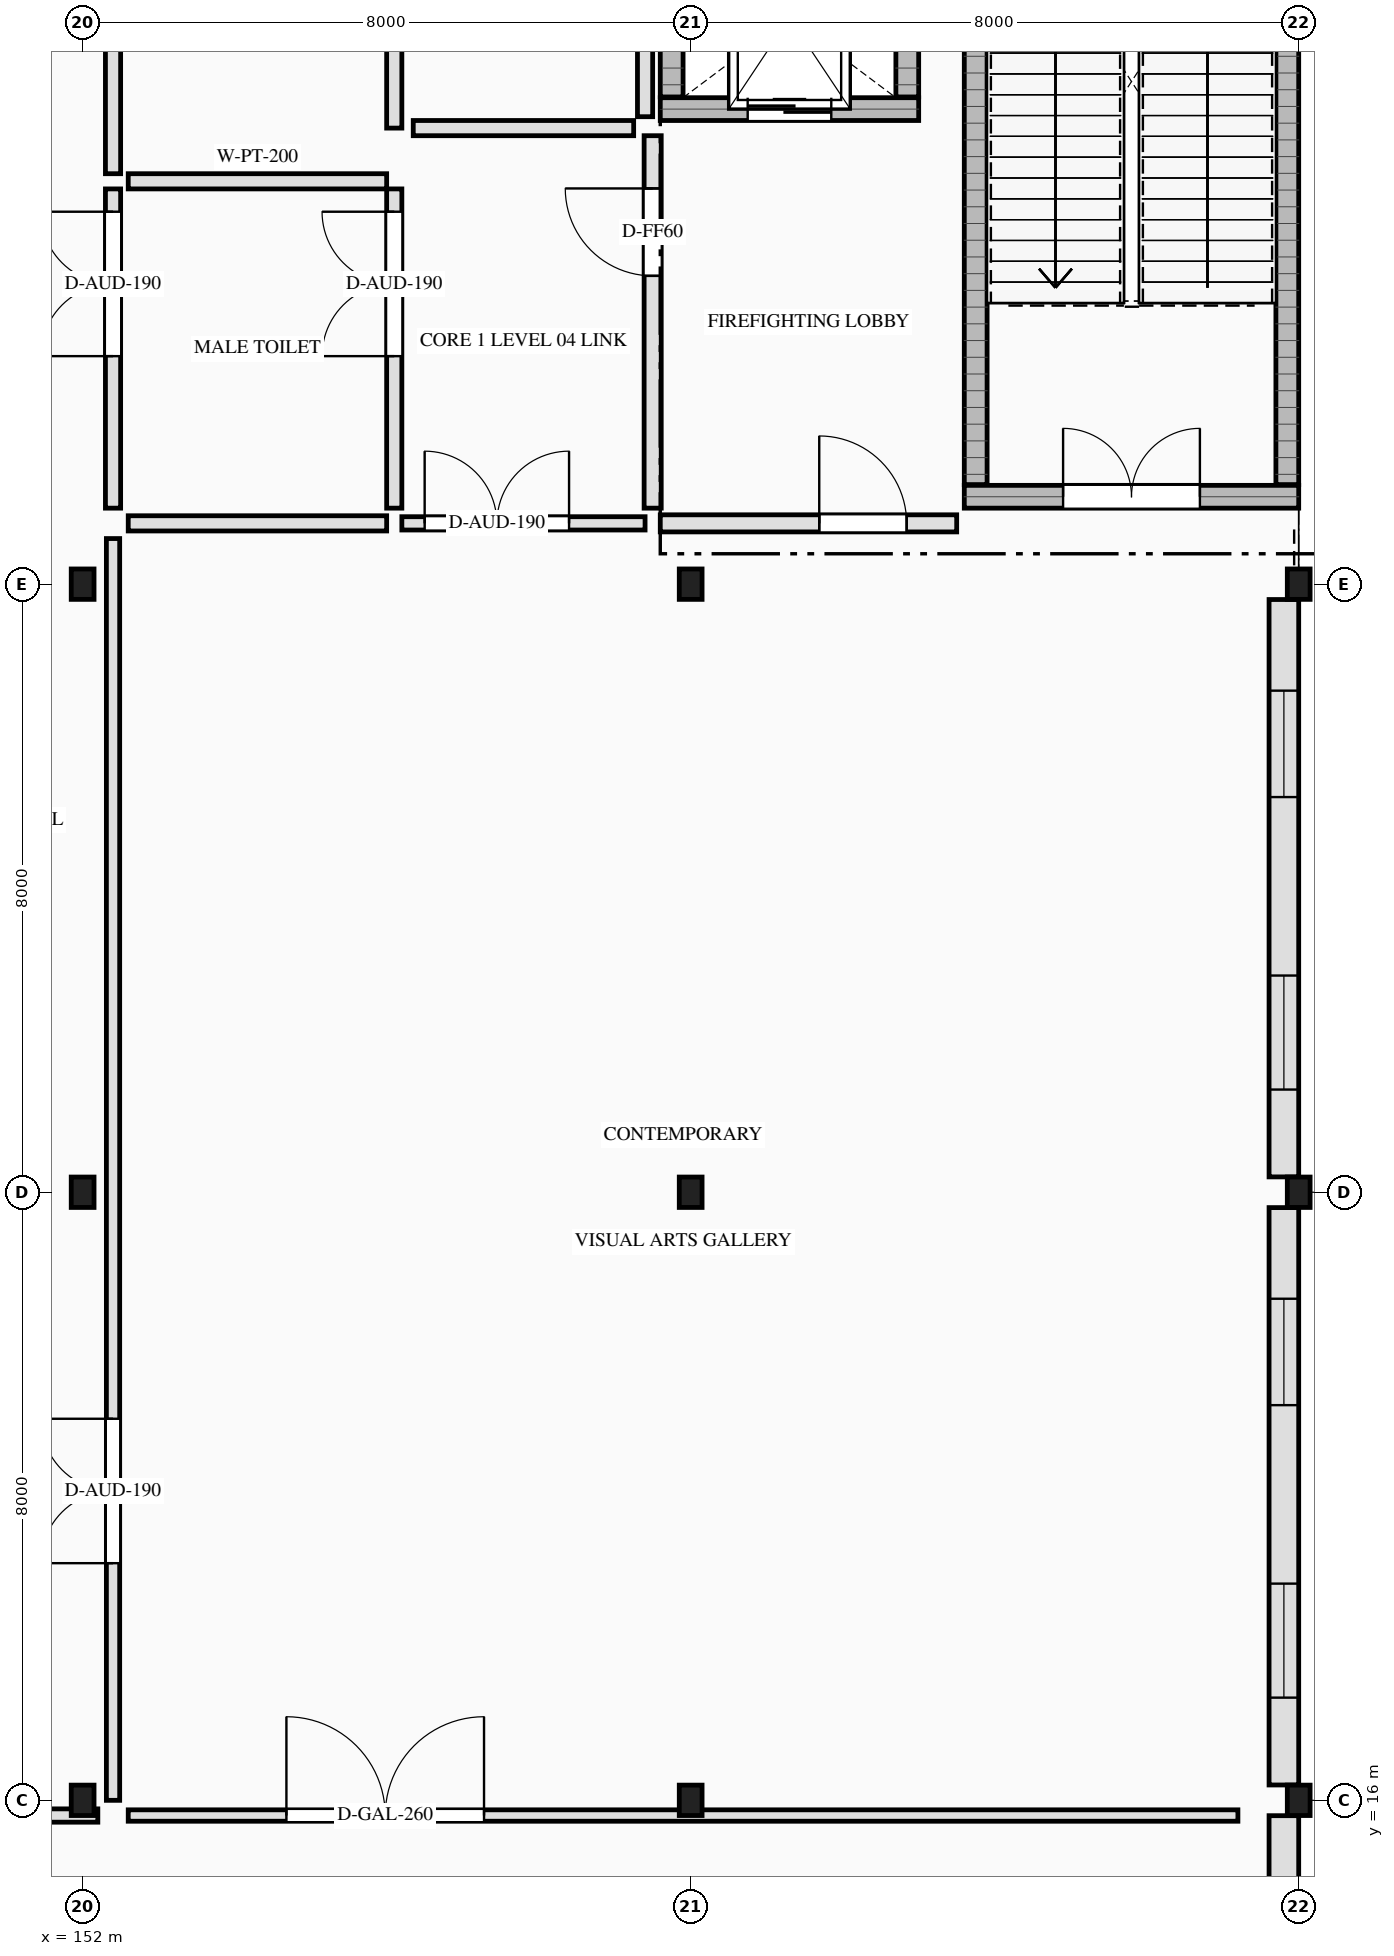
"""IFC4 building model, lengths in metres.
Left out: names, types, materials, properties, quantities, classifications, styles, units other than length and angle.
Written with IfcOpenShell. Run it as: python <this file> out.ifc"""

import sys

from ifc_helpers import new_model, si_unit, direction, frame, frame_2d, origin, origin_2d, place, context, subcontext, project, spatial, rectangle, i_section, extrude, element, fill, save


model = new_model("IFC4")
c1 = context("Model", 3, precision=1e-05, world=origin(), true_north=direction((0.0, 1.0)))
c2 = subcontext(c1, "Body", "Model", "MODEL_VIEW")
j1 = project(units=[si_unit("LENGTHUNIT", "METRE"), si_unit("PLANEANGLEUNIT", "RADIAN")], contexts=[c1])
p1 = place(None, origin())
s1 = spatial("IfcSite", under=j1, at=p1, CompositionType="ELEMENT")
p2 = place(p1, origin())
s2 = spatial("IfcBuilding", under=s1, at=p2, CompositionType="ELEMENT")
p3 = place(p2, frame((0.0, 0.0, 21.8)))
s3 = spatial("IfcBuildingStorey", under=s2, at=p3, CompositionType="ELEMENT", Elevation=21.8)
p4 = place(p3, frame((163.6, 33.15, 0.0), z_axis=(0.0, 0.0, 1.0), x_axis=(1.0, 0.0, 0.0)))
e1 = element("IfcWall", 1, at=p4, inside=s3, PredefinedType="SHEAR", context=c2, shape_type="SweptSolid", body=[
    extrude(rectangle(XDim=4.4, YDim=0.3, at=frame_2d((2.2, 0.0))), origin(), (0.0, 0.0, 1.0), 4.2),
])
p5 = place(p4, frame((1.3, 0.0, 0.0)))
e2 = element("IfcOpeningElement", 2, at=p5, cuts=e1, PredefinedType="OPENING", context=c2, shape_type="SweptSolid", body=[
    extrude(rectangle(XDim=1.8, YDim=2.2, at=frame_2d((0.9, 1.1))), frame((0.0, 0.16, 0.0), z_axis=(0.0, -1.0, 0.0), x_axis=(1.0, 0.0, 0.0)), (0.0, 0.0, 1.0), 0.32),
])
for number, where, z_axis, x_axis in (
    (3, (163.75, 33.31, 0.0), (0.0, 0.0, 1.0), (0.0, 1.0, 0.0)),
    (4, (167.85, 33.31, 0.0), (0.0, 0.0, 1.0), (0.0, 1.0, 0.0)),
):
    element("IfcWall", number, at=place(p3, frame(where, z_axis=z_axis, x_axis=x_axis)), inside=s3, PredefinedType="SHEAR", context=c2, shape_type="SweptSolid", body=[
        extrude(rectangle(XDim=9.38, YDim=0.3, at=frame_2d((4.69, 0.0))), origin(), (0.0, 0.0, 1.0), 4.2),
    ])
p6 = place(p3, frame((159.6, 38.25, 0.0), z_axis=(0.0, 0.0, 1.0), x_axis=(1.0, 0.0, 0.0)))
e5 = element("IfcWall", 5, at=p6, inside=s3, PredefinedType="SHEAR", context=c2, shape_type="SweptSolid", body=[
    extrude(rectangle(XDim=3.4, YDim=0.3, at=frame_2d((1.7, 0.0))), origin(), (0.0, 0.0, 1.0), 4.2),
])
p7 = place(p6, frame((1.15, 0.0, 0.0)))
e6 = element("IfcOpeningElement", 6, at=p7, cuts=e5, PredefinedType="OPENING", context=c2, shape_type="SweptSolid", body=[
    extrude(rectangle(XDim=1.1, YDim=2.15, at=frame_2d((0.55, 1.075))), frame((0.0, 0.16, 0.0), z_axis=(0.0, -1.0, 0.0), x_axis=(1.0, 0.0, 0.0)), (0.0, 0.0, 1.0), 0.32),
])
for number, where, z_axis, x_axis in (
    (7, (159.75, 38.41, 0.0), (0.0, 0.0, 1.0), (0.0, 1.0, 0.0)),
    (8, (162.85, 38.41, 0.0), (0.0, 0.0, 1.0), (0.0, 1.0, 0.0)),
):
    element("IfcWall", number, at=place(p3, frame(where, z_axis=z_axis, x_axis=x_axis)), inside=s3, PredefinedType="SHEAR", context=c2, shape_type="SweptSolid", body=[
        extrude(rectangle(XDim=2.08, YDim=0.3, at=frame_2d((1.04, 0.0))), origin(), (0.0, 0.0, 1.0), 4.2),
    ])
for number, where, z_axis, x_axis in (
    (9, (152.0, 16.0, 0.0), (0.0, 0.0, 1.0), (1.0, 0.0, 0.0)),
    (10, (152.0, 24.0, 0.0), (0.0, 0.0, 1.0), (1.0, 0.0, 0.0)),
    (11, (152.0, 32.0, 0.0), (0.0, 0.0, 1.0), (1.0, 0.0, 0.0)),
    (12, (160.0, 16.0, 0.0), (0.0, 0.0, 1.0), (1.0, 0.0, 0.0)),
    (13, (160.0, 24.0, 0.0), (0.0, 0.0, 1.0), (1.0, 0.0, 0.0)),
    (14, (160.0, 32.0, 0.0), (0.0, 0.0, 1.0), (1.0, 0.0, 0.0)),
    (15, (168.0, 16.0, 0.0), (0.0, 0.0, 1.0), (1.0, 0.0, 0.0)),
    (16, (168.0, 24.0, 0.0), (0.0, 0.0, 1.0), (1.0, 0.0, 0.0)),
    (17, (168.0, 32.0, 0.0), (0.0, 0.0, 1.0), (1.0, 0.0, 0.0)),
):
    element("IfcColumn", number, at=place(p3, frame(where, z_axis=z_axis, x_axis=x_axis)), inside=s3, PredefinedType="COLUMN", context=c2, shape_type="SweptSolid", body=[
        extrude(i_section(OverallWidth=0.3, OverallDepth=0.4, WebThickness=0.013, FlangeThickness=0.024, FilletRadius=0.027, at=origin_2d()), origin(), (0.0, 0.0, 1.0), 4.2),
    ])
p8 = place(p3, frame((167.805, 15.798, 0.0), z_axis=(0.0, 0.0, 1.0), x_axis=(0.0, -1.0, 0.0)))
e18 = element("IfcWall", 18, at=p8, inside=s3, PredefinedType="SOLIDWALL", context=c2, shape_type="SweptSolid", body=[
    extrude(rectangle(XDim=7.596, YDim=0.39, at=frame_2d((3.798, 0.0))), origin(), (0.0, 0.0, 1.0), 3.415),
])
p9 = place(p3, frame((167.805, 23.798, 0.0), z_axis=(0.0, 0.0, 1.0), x_axis=(0.0, -1.0, 0.0)))
e19 = element("IfcWall", 19, at=p9, inside=s3, PredefinedType="SOLIDWALL", context=c2, shape_type="SweptSolid", body=[
    extrude(rectangle(XDim=7.596, YDim=0.39, at=frame_2d((3.798, 0.0))), origin(), (0.0, 0.0, 1.0), 3.415),
])
p10 = place(p9, frame((1.199, 0.0, 0.85)))
e20 = element("IfcOpeningElement", 20, at=p10, cuts=e19, PredefinedType="OPENING", context=c2, shape_type="SweptSolid", body=[
    extrude(rectangle(XDim=1.4, YDim=1.6, at=frame_2d((0.7, 0.8))), frame((0.0, 0.205, 0.0), z_axis=(0.0, -1.0, 0.0), x_axis=(1.0, 0.0, 0.0)), (0.0, 0.0, 1.0), 0.41),
])
p11 = place(p9, frame((4.947, 0.0, 0.85)))
e21 = element("IfcOpeningElement", 21, at=p11, cuts=e19, PredefinedType="OPENING", context=c2, shape_type="SweptSolid", body=[
    extrude(rectangle(XDim=1.5, YDim=2.4, at=frame_2d((0.75, 1.2))), frame((0.0, 0.205, 0.0), z_axis=(0.0, -1.0, 0.0), x_axis=(1.0, 0.0, 0.0)), (0.0, 0.0, 1.0), 0.41),
])
p12 = place(p3, frame((167.805, 31.798, 0.0), z_axis=(0.0, 0.0, 1.0), x_axis=(0.0, -1.0, 0.0)))
e22 = element("IfcWall", 22, at=p12, inside=s3, PredefinedType="SOLIDWALL", context=c2, shape_type="SweptSolid", body=[
    extrude(rectangle(XDim=7.596, YDim=0.39, at=frame_2d((3.798, 0.0))), origin(), (0.0, 0.0, 1.0), 3.415),
])
p13 = place(p12, frame((1.199, 0.0, 0.85)))
e23 = element("IfcOpeningElement", 23, at=p13, cuts=e22, PredefinedType="OPENING", context=c2, shape_type="SweptSolid", body=[
    extrude(rectangle(XDim=1.4, YDim=1.6, at=frame_2d((0.7, 0.8))), frame((0.0, 0.205, 0.0), z_axis=(0.0, -1.0, 0.0), x_axis=(1.0, 0.0, 0.0)), (0.0, 0.0, 1.0), 0.41),
])
p14 = place(p12, frame((4.947, 0.0, 0.85)))
e24 = element("IfcOpeningElement", 24, at=p14, cuts=e22, PredefinedType="OPENING", context=c2, shape_type="SweptSolid", body=[
    extrude(rectangle(XDim=1.5, YDim=2.4, at=frame_2d((0.75, 1.2))), frame((0.0, 0.205, 0.0), z_axis=(0.0, -1.0, 0.0), x_axis=(1.0, 0.0, 0.0)), (0.0, 0.0, 1.0), 0.41),
])
p15 = place(p3, frame((159.5, 33.0, 0.0), z_axis=(0.0, 0.0, 1.0), x_axis=(0.0, 1.0, 0.0)))
e25 = element("IfcWall", 25, at=p15, inside=s3, PredefinedType="SOLIDWALL", context=c2, shape_type="SweptSolid", body=[
    extrude(rectangle(XDim=4.9, YDim=0.225, at=frame_2d((2.45, 0.0))), origin(), (0.0, 0.0, 1.0), 3.92),
])
p16 = place(p15, frame((3.056, 0.0, 0.0)))
e26 = element("IfcOpeningElement", 26, at=p16, cuts=e25, PredefinedType="OPENING", context=c2, shape_type="SweptSolid", body=[
    extrude(rectangle(XDim=1.15, YDim=2.2, at=frame_2d((0.575, 1.1))), frame((0.0, 0.123, 0.0), z_axis=(0.0, -1.0, 0.0), x_axis=(1.0, 0.0, 0.0)), (0.0, 0.0, 1.0), 0.245),
])
p17 = place(p3, frame((159.6, 32.8, 0.0), z_axis=(0.0, 0.0, 1.0), x_axis=(1.0, 0.0, 0.0)))
e27 = element("IfcWall", 27, at=p17, inside=s3, PredefinedType="SOLIDWALL", context=c2, shape_type="SweptSolid", body=[
    extrude(rectangle(XDim=3.9, YDim=0.225, at=frame_2d((1.95, 0.0))), origin(), (0.0, 0.0, 1.0), 3.92),
])
p18 = place(p17, frame((2.092, 0.0, 0.0)))
e28 = element("IfcOpeningElement", 28, at=p18, cuts=e27, PredefinedType="OPENING", context=c2, shape_type="SweptSolid", body=[
    extrude(rectangle(XDim=1.15, YDim=2.2, at=frame_2d((0.575, 1.1))), frame((0.0, 0.123, 0.0), z_axis=(0.0, -1.0, 0.0), x_axis=(1.0, 0.0, 0.0)), (0.0, 0.0, 1.0), 0.245),
])
p19 = place(p3, frame((152.6, 37.3, 0.0), z_axis=(0.0, 0.0, 1.0), x_axis=(1.0, 0.0, 0.0)))
e29 = element("IfcWall", 29, at=p19, inside=s3, PredefinedType="PARTITIONING", context=c2, shape_type="SweptSolid", body=[
    extrude(rectangle(XDim=3.4, YDim=0.2, at=frame_2d((1.7, 0.0))), origin(), (0.0, 0.0, 1.0), 3.92),
])
p20 = place(p3, frame((152.4, 33.0, 0.0), z_axis=(0.0, 0.0, 1.0), x_axis=(0.0, 1.0, 0.0)))
e30 = element("IfcWall", 30, at=p20, inside=s3, PredefinedType="PARTITIONING", context=c2, shape_type="SweptSolid", body=[
    extrude(rectangle(XDim=4.2, YDim=0.2, at=frame_2d((2.1, 0.0))), origin(), (0.0, 0.0, 1.0), 3.92),
])
p21 = place(p20, frame((2.0, 0.0, 0.0)))
e31 = element("IfcOpeningElement", 31, at=p21, cuts=e30, PredefinedType="OPENING", context=c2, shape_type="SweptSolid", body=[
    extrude(rectangle(XDim=1.9, YDim=2.35, at=frame_2d((0.95, 1.175))), frame((0.0, 0.11, 0.0), z_axis=(0.0, -1.0, 0.0), x_axis=(1.0, 0.0, 0.0)), (0.0, 0.0, 1.0), 0.22),
])
p22 = place(p3, frame((156.1, 33.0, 0.0), z_axis=(0.0, 0.0, 1.0), x_axis=(0.0, 1.0, 0.0)))
e32 = element("IfcWall", 32, at=p22, inside=s3, PredefinedType="PARTITIONING", context=c2, shape_type="SweptSolid", body=[
    extrude(rectangle(XDim=4.2, YDim=0.2, at=frame_2d((2.1, 0.0))), origin(), (0.0, 0.0, 1.0), 3.92),
])
p23 = place(p22, frame((2.0, 0.0, 0.0)))
e33 = element("IfcOpeningElement", 33, at=p23, cuts=e32, PredefinedType="OPENING", context=c2, shape_type="SweptSolid", body=[
    extrude(rectangle(XDim=1.9, YDim=2.35, at=frame_2d((0.95, 1.175))), frame((0.0, 0.11, 0.0), z_axis=(0.0, -1.0, 0.0), x_axis=(1.0, 0.0, 0.0)), (0.0, 0.0, 1.0), 0.22),
])
p24 = place(p3, frame((152.6, 32.8, 0.0), z_axis=(0.0, 0.0, 1.0), x_axis=(1.0, 0.0, 0.0)))
e34 = element("IfcWall", 34, at=p24, inside=s3, PredefinedType="PARTITIONING", context=c2, shape_type="SweptSolid", body=[
    extrude(rectangle(XDim=3.4, YDim=0.2, at=frame_2d((1.7, 0.0))), origin(), (0.0, 0.0, 1.0), 3.92),
])
p25 = place(p3, frame((156.1, 38.0, 0.0), z_axis=(0.0, 0.0, 1.0), x_axis=(0.0, 1.0, 0.0)))
e35 = element("IfcWall", 35, at=p25, inside=s3, PredefinedType="PARTITIONING", context=c2, shape_type="SweptSolid", body=[
    extrude(rectangle(XDim=3.6, YDim=0.2, at=frame_2d((1.8, 0.0))), origin(), (0.0, 0.0, 1.0), 3.92),
])
p26 = place(p3, frame((152.4, 37.4, 0.0), z_axis=(0.0, 0.0, 1.0), x_axis=(0.0, 1.0, 0.0)))
e36 = element("IfcWall", 36, at=p26, inside=s3, PredefinedType="PARTITIONING", context=c2, shape_type="SweptSolid", body=[
    extrude(rectangle(XDim=4.2, YDim=0.2, at=frame_2d((2.1, 0.0))), origin(), (0.0, 0.0, 1.0), 3.92),
])
p27 = place(p3, frame((149.0, 15.8, 0.0), z_axis=(0.0, 0.0, 1.0), x_axis=(1.0, 0.0, 0.0)))
e37 = element("IfcWall", 37, at=p27, inside=s3, PredefinedType="PARTITIONING", context=c2, shape_type="SweptSolid", body=[
    extrude(rectangle(XDim=3.2, YDim=0.175, at=frame_2d((1.6, 0.0))), origin(), (0.0, 0.0, 1.0), 3.48),
])
p28 = place(p3, frame((152.4, 16.0, 0.0), z_axis=(0.0, 0.0, 1.0), x_axis=(0.0, 1.0, 0.0)))
e38 = element("IfcWall", 38, at=p28, inside=s3, PredefinedType="PARTITIONING", context=c2, shape_type="SweptSolid", body=[
    extrude(rectangle(XDim=16.6, YDim=0.175, at=frame_2d((8.3, 0.0))), origin(), (0.0, 0.0, 1.0), 3.92),
])
p29 = place(p28, frame((3.12, 0.0, 0.0)))
e39 = element("IfcOpeningElement", 39, at=p29, cuts=e38, PredefinedType="OPENING", context=c2, shape_type="SweptSolid", body=[
    extrude(rectangle(XDim=1.9, YDim=2.35, at=frame_2d((0.95, 1.175))), frame((0.0, 0.097, 0.0), z_axis=(0.0, -1.0, 0.0), x_axis=(1.0, 0.0, 0.0)), (0.0, 0.0, 1.0), 0.195),
])
p30 = place(p3, frame((156.2, 32.8, 0.0), z_axis=(0.0, 0.0, 1.0), x_axis=(1.0, 0.0, 0.0)))
e40 = element("IfcWall", 40, at=p30, inside=s3, PredefinedType="PARTITIONING", context=c2, shape_type="SweptSolid", body=[
    extrude(rectangle(XDim=3.2, YDim=0.175, at=frame_2d((1.6, 0.0))), origin(), (0.0, 0.0, 1.0), 3.92),
])
p31 = place(p30, frame((0.3, 0.0, 0.0)))
e41 = element("IfcOpeningElement", 41, at=p31, cuts=e40, PredefinedType="OPENING", context=c2, shape_type="SweptSolid", body=[
    extrude(rectangle(XDim=1.9, YDim=2.35, at=frame_2d((0.95, 1.175))), frame((0.0, 0.097, 0.0), z_axis=(0.0, -1.0, 0.0), x_axis=(1.0, 0.0, 0.0)), (0.0, 0.0, 1.0), 0.195),
])
p32 = place(p3, frame((152.6, 15.8, 0.0), z_axis=(0.0, 0.0, 1.0), x_axis=(1.0, 0.0, 0.0)))
e42 = element("IfcWall", 42, at=p32, inside=s3, PredefinedType="PARTITIONING", context=c2, shape_type="SweptSolid", body=[
    extrude(rectangle(XDim=14.6, YDim=0.15, at=frame_2d((7.3, 0.0))), origin(), (0.0, 0.0, 1.0), 3.48),
])
p33 = place(p32, frame((2.081, 0.0, 0.0)))
e43 = element("IfcOpeningElement", 43, at=p33, cuts=e42, PredefinedType="OPENING", context=c2, shape_type="SweptSolid", body=[
    extrude(rectangle(XDim=2.6, YDim=2.9, at=frame_2d((1.3, 1.45))), frame((0.0, 0.085, 0.0), z_axis=(0.0, -1.0, 0.0), x_axis=(1.0, 0.0, 0.0)), (0.0, 0.0, 1.0), 0.17),
])
p34 = place(p3, frame((156.35, 38.0, 0.0), z_axis=(0.0, 0.0, 1.0), x_axis=(1.0, 0.0, 0.0)))
e44 = element("IfcWall", 44, at=p34, inside=s3, PredefinedType="PARTITIONING", context=c2, shape_type="SweptSolid", body=[
    extrude(rectangle(XDim=2.9, YDim=0.2, at=frame_2d((1.45, 0.0))), origin(), (0.0, 0.0, 1.0), 3.92),
])
p35 = place(p3, frame((159.4, 38.15, 0.0), z_axis=(0.0, 0.0, 1.0), x_axis=(0.0, 1.0, 0.0)))
e45 = element("IfcWall", 45, at=p35, inside=s3, PredefinedType="PARTITIONING", context=c2, shape_type="SweptSolid", body=[
    extrude(rectangle(XDim=3.3, YDim=0.2, at=frame_2d((1.65, 0.0))), origin(), (0.0, 0.0, 1.0), 3.92),
])
p36 = place(p10, origin())
e46 = element("IfcWindow", 46, at=p36, inside=s3, PartitioningType="SINGLE_PANEL", PredefinedType="WINDOW", context=c2, shape_type="SweptSolid", body=[
    extrude(rectangle(XDim=1.4, YDim=1.6, at=frame_2d((0.7, 0.8))), frame((0.0, 0.03, 0.0), z_axis=(0.0, -1.0, 0.0), x_axis=(1.0, 0.0, 0.0)), (0.0, 0.0, 1.0), 0.06),
])
fill(e20, e46)
p37 = place(p11, origin())
e47 = element("IfcWindow", 47, at=p37, inside=s3, PartitioningType="SINGLE_PANEL", PredefinedType="WINDOW", context=c2, shape_type="SweptSolid", body=[
    extrude(rectangle(XDim=1.5, YDim=2.4, at=frame_2d((0.75, 1.2))), frame((0.0, 0.03, 0.0), z_axis=(0.0, -1.0, 0.0), x_axis=(1.0, 0.0, 0.0)), (0.0, 0.0, 1.0), 0.06),
])
fill(e21, e47)
p38 = place(p13, origin())
e48 = element("IfcWindow", 48, at=p38, inside=s3, PartitioningType="SINGLE_PANEL", PredefinedType="WINDOW", context=c2, shape_type="SweptSolid", body=[
    extrude(rectangle(XDim=1.4, YDim=1.6, at=frame_2d((0.7, 0.8))), frame((0.0, 0.03, 0.0), z_axis=(0.0, -1.0, 0.0), x_axis=(1.0, 0.0, 0.0)), (0.0, 0.0, 1.0), 0.06),
])
fill(e23, e48)
p39 = place(p14, origin())
e49 = element("IfcWindow", 49, at=p39, inside=s3, PartitioningType="SINGLE_PANEL", PredefinedType="WINDOW", context=c2, shape_type="SweptSolid", body=[
    extrude(rectangle(XDim=1.5, YDim=2.4, at=frame_2d((0.75, 1.2))), frame((0.0, 0.03, 0.0), z_axis=(0.0, -1.0, 0.0), x_axis=(1.0, 0.0, 0.0)), (0.0, 0.0, 1.0), 0.06),
])
fill(e24, e49)
p40 = place(p5, origin())
e50 = element("IfcDoor", 50, at=p40, inside=s3, OperationType="DOUBLE_DOOR_SINGLE_SWING", PredefinedType="DOOR", context=c2, shape_type="SweptSolid", body=[
    extrude(rectangle(XDim=1.8, YDim=2.2, at=frame_2d((0.9, 1.1))), frame((0.0, 0.025, 0.0), z_axis=(0.0, -1.0, 0.0), x_axis=(1.0, 0.0, 0.0)), (0.0, 0.0, 1.0), 0.05),
])
fill(e2, e50)
p41 = place(p7, origin())
e51 = element("IfcDoor", 51, at=p41, inside=s3, OperationType="SLIDING_TO_LEFT", PredefinedType="DOOR", context=c2, shape_type="SweptSolid", body=[
    extrude(rectangle(XDim=1.1, YDim=2.15, at=frame_2d((0.55, 1.075))), frame((0.0, 0.025, 0.0), z_axis=(0.0, -1.0, 0.0), x_axis=(1.0, 0.0, 0.0)), (0.0, 0.0, 1.0), 0.05),
])
fill(e6, e51)
p42 = place(p16, origin())
e52 = element("IfcDoor", 52, at=p42, inside=s3, OperationType="SINGLE_SWING_RIGHT", PredefinedType="DOOR", context=c2, shape_type="SweptSolid", body=[
    extrude(rectangle(XDim=1.15, YDim=2.2, at=frame_2d((0.575, 1.1))), frame((0.0, 0.025, 0.0), z_axis=(0.0, -1.0, 0.0), x_axis=(1.0, 0.0, 0.0)), (0.0, 0.0, 1.0), 0.05),
])
fill(e26, e52)
p43 = place(p18, origin())
e53 = element("IfcDoor", 53, at=p43, inside=s3, OperationType="SINGLE_SWING_LEFT", PredefinedType="DOOR", context=c2, shape_type="SweptSolid", body=[
    extrude(rectangle(XDim=1.15, YDim=2.2, at=frame_2d((0.575, 1.1))), frame((0.0, 0.025, 0.0), z_axis=(0.0, -1.0, 0.0), x_axis=(1.0, 0.0, 0.0)), (0.0, 0.0, 1.0), 0.05),
])
fill(e28, e53)
p44 = place(p21, origin())
e54 = element("IfcDoor", 54, at=p44, inside=s3, OperationType="DOUBLE_DOOR_SINGLE_SWING", PredefinedType="DOOR", context=c2, shape_type="SweptSolid", body=[
    extrude(rectangle(XDim=1.9, YDim=2.35, at=frame_2d((0.95, 1.175))), frame((0.0, 0.025, 0.0), z_axis=(0.0, -1.0, 0.0), x_axis=(1.0, 0.0, 0.0)), (0.0, 0.0, 1.0), 0.05),
])
fill(e31, e54)
p45 = place(p23, origin())
e55 = element("IfcDoor", 55, at=p45, inside=s3, OperationType="DOUBLE_DOOR_SINGLE_SWING", PredefinedType="DOOR", context=c2, shape_type="SweptSolid", body=[
    extrude(rectangle(XDim=1.9, YDim=2.35, at=frame_2d((0.95, 1.175))), frame((0.0, 0.025, 0.0), z_axis=(0.0, -1.0, 0.0), x_axis=(1.0, 0.0, 0.0)), (0.0, 0.0, 1.0), 0.05),
])
fill(e33, e55)
p46 = place(p29, origin())
e56 = element("IfcDoor", 56, at=p46, inside=s3, OperationType="DOUBLE_DOOR_SINGLE_SWING", PredefinedType="DOOR", context=c2, shape_type="SweptSolid", body=[
    extrude(rectangle(XDim=1.9, YDim=2.35, at=frame_2d((0.95, 1.175))), frame((0.0, 0.025, 0.0), z_axis=(0.0, -1.0, 0.0), x_axis=(1.0, 0.0, 0.0)), (0.0, 0.0, 1.0), 0.05),
])
fill(e39, e56)
p47 = place(p31, origin())
e57 = element("IfcDoor", 57, at=p47, inside=s3, OperationType="DOUBLE_DOOR_SINGLE_SWING", PredefinedType="DOOR", context=c2, shape_type="SweptSolid", body=[
    extrude(rectangle(XDim=1.9, YDim=2.35, at=frame_2d((0.95, 1.175))), frame((0.0, 0.025, 0.0), z_axis=(0.0, -1.0, 0.0), x_axis=(1.0, 0.0, 0.0)), (0.0, 0.0, 1.0), 0.05),
])
fill(e41, e57)
p48 = place(p33, origin())
e58 = element("IfcDoor", 58, at=p48, inside=s3, OperationType="DOUBLE_DOOR_DOUBLE_SWING", PredefinedType="DOOR", context=c2, shape_type="SweptSolid", body=[
    extrude(rectangle(XDim=2.6, YDim=2.9, at=frame_2d((1.3, 1.45))), frame((0.0, 0.025, 0.0), z_axis=(0.0, -1.0, 0.0), x_axis=(1.0, 0.0, 0.0)), (0.0, 0.0, 1.0), 0.05),
])
fill(e43, e58)
save(model, sys.argv[1])
